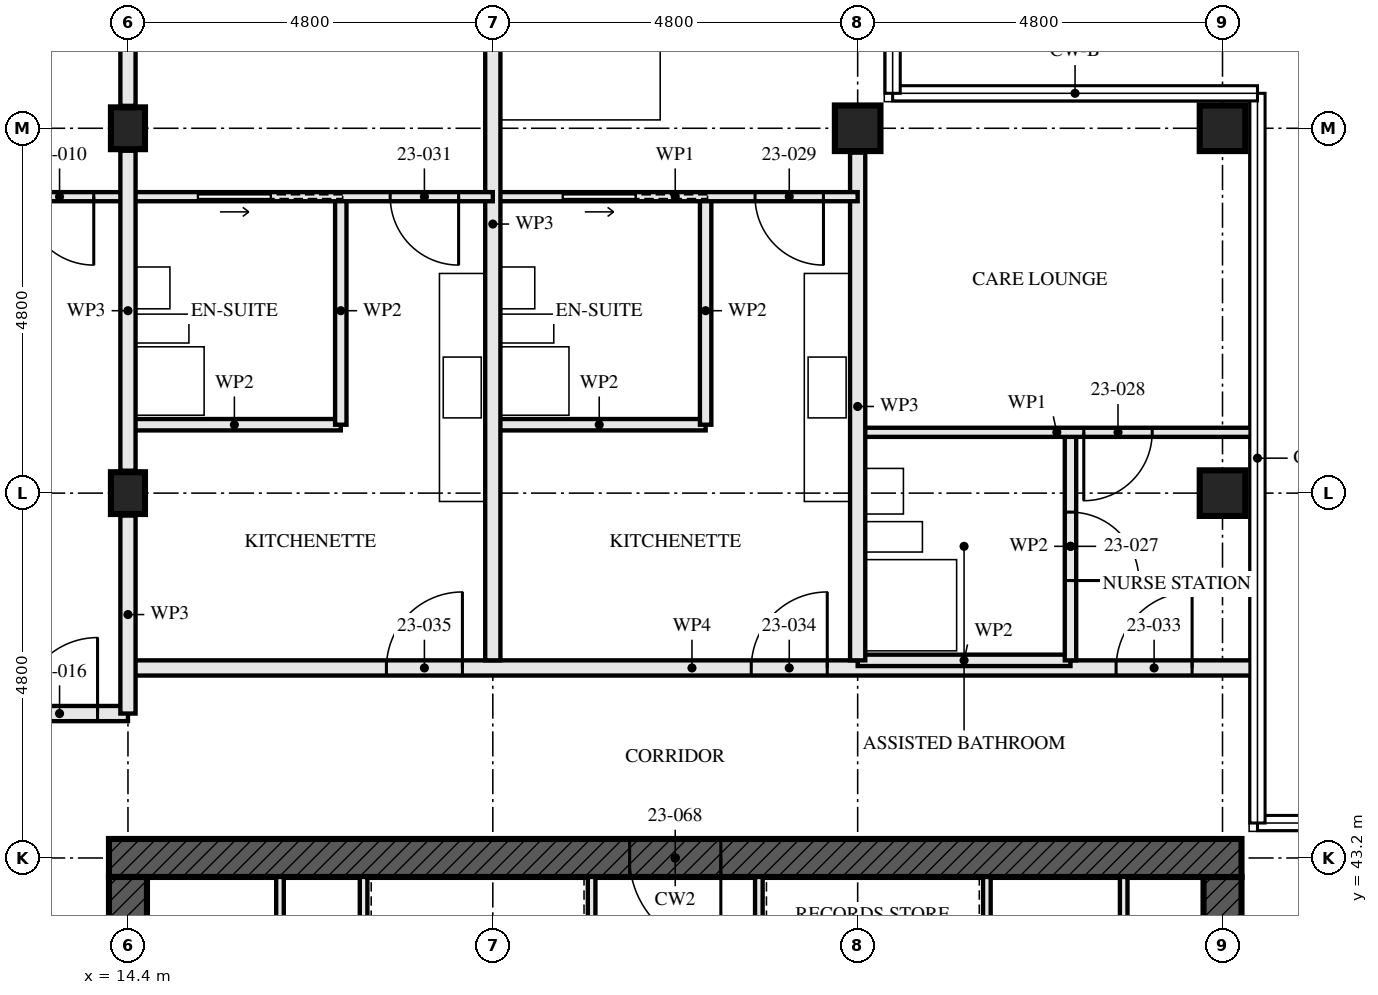
"""IFC4 building model, lengths in metres.
Left out: names, types, materials, properties, quantities, classifications, styles, units other than length and angle.
Written with IfcOpenShell. Run it as: python <this file> out.ifc"""

import sys

from ifc_helpers import new_model, si_unit, direction, frame, frame_2d, origin, origin_2d, place, context, subcontext, project, spatial, rectangle, hollow_rectangle, i_section, extrude, element, fill, save


model = new_model("IFC4")
c1 = context("Model", 3, precision=1e-05, world=origin(), true_north=direction((0.0, 1.0)))
c2 = subcontext(c1, "Body", "Model", "MODEL_VIEW")
j1 = project(units=[si_unit("LENGTHUNIT", "METRE"), si_unit("PLANEANGLEUNIT", "RADIAN")], contexts=[c1])
p1 = place(None, origin())
s1 = spatial("IfcSite", under=j1, at=p1, CompositionType="ELEMENT")
p2 = place(p1, origin())
s2 = spatial("IfcBuilding", under=s1, at=p2, CompositionType="ELEMENT")
p3 = place(p2, frame((0.0, 0.0, 87.5)))
s3 = spatial("IfcBuildingStorey", under=s2, at=p3, CompositionType="ELEMENT", Elevation=87.5)
for number, where, z_axis, x_axis in (
    (1, (14.4, 48.0, 0.0), (0.0, 0.0, 1.0), (1.0, 0.0, 0.0)),
    (2, (14.4, 52.8, 0.0), (0.0, 0.0, 1.0), (1.0, 0.0, 0.0)),
):
    element("IfcColumn", number, at=place(p3, frame(where, z_axis=z_axis, x_axis=x_axis)), inside=s3, PredefinedType="COLUMN", context=c2, shape_type="SweptSolid", body=[
        extrude(i_section(OverallWidth=0.448, OverallDepth=0.55, WebThickness=0.072, FlangeThickness=0.115, FilletRadius=0.015, at=origin_2d()), origin(), (0.0, 0.0, 1.0), 3.5),
    ])
for number, where, z_axis, x_axis in (
    (3, (24.0, 52.8, 0.0), (0.0, 0.0, 1.0), (0.0, 1.0, 0.0)),
    (4, (28.8, 48.0, 0.0), (0.0, 0.0, 1.0), (1.0, 0.0, 0.0)),
    (5, (28.8, 52.8, 0.0), (0.0, 0.0, 1.0), (0.0, 1.0, 0.0)),
):
    element("IfcColumn", number, at=place(p3, frame(where, z_axis=z_axis, x_axis=x_axis)), inside=s3, PredefinedType="COLUMN", context=c2, shape_type="SweptSolid", body=[
        extrude(hollow_rectangle(XDim=0.6, YDim=0.6, WallThickness=0.08, at=origin_2d()), origin(), (0.0, 0.0, 1.0), 3.5),
    ])
p4 = place(p3, frame((29.05, 43.2, -0.17), z_axis=(0.0, 0.0, 1.0), x_axis=(-1.0, 0.0, 0.0)))
e6 = element("IfcWall", 6, at=p4, inside=s3, PredefinedType="SHEAR", context=c2, shape_type="SweptSolid", body=[
    extrude(rectangle(XDim=14.9, YDim=0.5, at=frame_2d((7.45, 0.0))), origin(), (0.0, 0.0, 1.0), 3.5),
])
p5 = place(p4, frame((6.85, 0.0, 0.17)))
e7 = element("IfcOpeningElement", 7, at=p5, cuts=e6, PredefinedType="OPENING", context=c2, shape_type="SweptSolid", body=[
    extrude(rectangle(XDim=1.2, YDim=2.1, at=frame_2d((0.6, 1.05))), frame((0.0, 0.26, 0.0), z_axis=(0.0, -1.0, 0.0), x_axis=(1.0, 0.0, 0.0)), (0.0, 0.0, 1.0), 0.521),
])
p6 = place(p3, frame((14.4, 42.95, -0.17), z_axis=(0.0, 0.0, 1.0), x_axis=(0.0, -1.0, 0.0)))
e8 = element("IfcWall", 8, at=p6, inside=s3, PredefinedType="SHEAR", context=c2, shape_type="SweptSolid", body=[
    extrude(rectangle(XDim=13.9, YDim=0.5, at=frame_2d((6.95, 0.0))), origin(), (0.0, 0.0, 1.0), 3.5),
])
p7 = place(p6, frame((6.35, 0.0, 0.17)))
e9 = element("IfcOpeningElement", 9, at=p7, cuts=e8, PredefinedType="OPENING", context=c2, shape_type="SweptSolid", body=[
    extrude(rectangle(XDim=1.2, YDim=2.1, at=frame_2d((0.6, 1.05))), frame((0.0, 0.26, 0.0), z_axis=(0.0, -1.0, 0.0), x_axis=(1.0, 0.0, 0.0)), (0.0, 0.0, 1.0), 0.521),
])
p8 = place(p3, frame((28.8, 29.05, -0.17), z_axis=(0.0, 0.0, 1.0), x_axis=(0.0, 1.0, 0.0)))
e10 = element("IfcWall", 10, at=p8, inside=s3, PredefinedType="SHEAR", context=c2, shape_type="SweptSolid", body=[
    extrude(rectangle(XDim=13.9, YDim=0.5, at=frame_2d((6.95, 0.0))), origin(), (0.0, 0.0, 1.0), 3.5),
])
p9 = place(p8, frame((6.35, 0.0, 0.17)))
e11 = element("IfcOpeningElement", 11, at=p9, cuts=e10, PredefinedType="OPENING", context=c2, shape_type="SweptSolid", body=[
    extrude(rectangle(XDim=1.2, YDim=2.1, at=frame_2d((0.6, 1.05))), frame((0.0, 0.26, 0.0), z_axis=(0.0, -1.0, 0.0), x_axis=(1.0, 0.0, 0.0)), (0.0, 0.0, 1.0), 0.521),
])
p10 = place(p3, frame((14.4, 51.9, 0.0), z_axis=(0.0, 0.0, 1.0), x_axis=(-1.0, 0.0, 0.0)))
e12 = element("IfcWall", 12, at=p10, inside=s3, PredefinedType="PARTITIONING", context=c2, shape_type="SweptSolid", body=[
    extrude(rectangle(XDim=4.8, YDim=0.12, at=frame_2d((2.4, 0.0))), origin(), (0.0, 0.0, 1.0), 3.33),
])
p11 = place(p10, frame((0.45, 0.0, 0.0)))
e13 = element("IfcOpeningElement", 13, at=p11, cuts=e12, PredefinedType="OPENING", context=c2, shape_type="SweptSolid", body=[
    extrude(rectangle(XDim=0.9, YDim=2.1, at=frame_2d((0.45, 1.05))), frame((0.0, 0.071, 0.0), z_axis=(0.0, -1.0, 0.0), x_axis=(1.0, 0.0, 0.0)), (0.0, 0.0, 1.0), 0.141),
])
p12 = place(p10, frame((2.925, 0.0, 0.0)))
e14 = element("IfcOpeningElement", 14, at=p12, cuts=e12, PredefinedType="OPENING", context=c2, shape_type="SweptSolid", body=[
    extrude(rectangle(XDim=0.95, YDim=2.1, at=frame_2d((0.475, 1.05))), frame((0.0, 0.071, 0.0), z_axis=(0.0, -1.0, 0.0), x_axis=(1.0, 0.0, 0.0)), (0.0, 0.0, 1.0), 0.141),
])
p13 = place(p3, frame((14.4, 45.1, 0.0), z_axis=(0.0, 0.0, 1.0), x_axis=(-1.0, 0.0, 0.0)))
e15 = element("IfcWall", 15, at=p13, inside=s3, PredefinedType="PARTITIONING", context=c2, shape_type="SweptSolid", body=[
    extrude(rectangle(XDim=9.6, YDim=0.2, at=frame_2d((4.8, 0.0))), origin(), (0.0, 0.0, 1.0), 3.33),
])
p14 = place(p13, frame((0.4, 0.0, 0.0)))
e16 = element("IfcOpeningElement", 16, at=p14, cuts=e15, PredefinedType="OPENING", context=c2, shape_type="SweptSolid", body=[
    extrude(rectangle(XDim=1.0, YDim=2.1, at=frame_2d((0.5, 1.05))), frame((0.0, 0.111, 0.0), z_axis=(0.0, -1.0, 0.0), x_axis=(1.0, 0.0, 0.0)), (0.0, 0.0, 1.0), 0.221),
])
p15 = place(p13, frame((5.2, 0.0, 0.0)))
e17 = element("IfcOpeningElement", 17, at=p15, cuts=e15, PredefinedType="OPENING", context=c2, shape_type="SweptSolid", body=[
    extrude(rectangle(XDim=1.0, YDim=2.1, at=frame_2d((0.5, 1.05))), frame((0.0, 0.111, 0.0), z_axis=(0.0, -1.0, 0.0), x_axis=(1.0, 0.0, 0.0)), (0.0, 0.0, 1.0), 0.221),
])
p16 = place(p3, frame((26.8, 48.8, 0.0), z_axis=(0.0, 0.0, 1.0), x_axis=(0.0, -1.0, 0.0)))
e18 = element("IfcWall", 18, at=p16, inside=s3, PredefinedType="PARTITIONING", context=c2, shape_type="SweptSolid", body=[
    extrude(rectangle(XDim=3.0, YDim=0.15, at=frame_2d((1.5, 0.0))), origin(), (0.0, 0.0, 1.0), 2.55),
])
p17 = place(p16, frame((1.05, 0.0, 0.0)))
e19 = element("IfcOpeningElement", 19, at=p17, cuts=e18, PredefinedType="OPENING", context=c2, shape_type="SweptSolid", body=[
    extrude(rectangle(XDim=0.9, YDim=2.1, at=frame_2d((0.45, 1.05))), frame((0.0, 0.085, 0.0), z_axis=(0.0, -1.0, 0.0), x_axis=(1.0, 0.0, 0.0)), (0.0, 0.0, 1.0), 0.171),
])
p18 = place(p3, frame((26.8, 45.8, 0.0), z_axis=(0.0, 0.0, 1.0), x_axis=(-1.0, 0.0, 0.0)))
e20 = element("IfcWall", 20, at=p18, inside=s3, PredefinedType="PARTITIONING", context=c2, shape_type="SweptSolid", body=[
    extrude(rectangle(XDim=2.8, YDim=0.15, at=frame_2d((1.4, 0.0))), origin(), (0.0, 0.0, 1.0), 3.33),
])
p19 = place(p3, frame((29.24, 48.8, 0.0), z_axis=(0.0, 0.0, 1.0), x_axis=(-1.0, 0.0, 0.0)))
e21 = element("IfcWall", 21, at=p19, inside=s3, PredefinedType="PARTITIONING", context=c2, shape_type="SweptSolid", body=[
    extrude(rectangle(XDim=5.24, YDim=0.12, at=frame_2d((2.62, 0.0))), origin(), (0.0, 0.0, 1.0), 2.32),
])
p20 = place(p19, frame((1.365, 0.0, 0.0)))
e22 = element("IfcOpeningElement", 22, at=p20, cuts=e21, PredefinedType="OPENING", context=c2, shape_type="SweptSolid", body=[
    extrude(rectangle(XDim=0.9, YDim=2.1, at=frame_2d((0.45, 1.05))), frame((0.0, 0.071, 0.0), z_axis=(0.0, -1.0, 0.0), x_axis=(1.0, 0.0, 0.0)), (0.0, 0.0, 1.0), 0.141),
])
p21 = place(p3, frame((24.0, 52.48, 0.0), z_axis=(0.0, 0.0, 1.0), x_axis=(0.0, -1.0, 0.0)))
e23 = element("IfcWall", 23, at=p21, inside=s3, PredefinedType="PARTITIONING", context=c2, shape_type="SweptSolid", body=[
    extrude(rectangle(XDim=6.68, YDim=0.2, at=frame_2d((3.34, 0.0))), origin(), (0.0, 0.0, 1.0), 2.55),
])
p22 = place(p3, frame((22.0, 51.9, 0.0), z_axis=(0.0, 0.0, 1.0), x_axis=(0.0, -1.0, 0.0)))
e24 = element("IfcWall", 24, at=p22, inside=s3, PredefinedType="PARTITIONING", context=c2, shape_type="SweptSolid", body=[
    extrude(rectangle(XDim=3.0, YDim=0.15, at=frame_2d((1.5, 0.0))), origin(), (0.0, 0.0, 1.0), 3.33),
])
p23 = place(p3, frame((22.0, 48.9, 0.0), z_axis=(0.0, 0.0, 1.0), x_axis=(-1.0, 0.0, 0.0)))
e25 = element("IfcWall", 25, at=p23, inside=s3, PredefinedType="PARTITIONING", context=c2, shape_type="SweptSolid", body=[
    extrude(rectangle(XDim=2.8, YDim=0.15, at=frame_2d((1.4, 0.0))), origin(), (0.0, 0.0, 1.0), 3.33),
])
p24 = place(p3, frame((24.0, 51.9, 0.0), z_axis=(0.0, 0.0, 1.0), x_axis=(-1.0, 0.0, 0.0)))
e26 = element("IfcWall", 26, at=p24, inside=s3, PredefinedType="PARTITIONING", context=c2, shape_type="SweptSolid", body=[
    extrude(rectangle(XDim=4.8, YDim=0.12, at=frame_2d((2.4, 0.0))), origin(), (0.0, 0.0, 1.0), 3.33),
])
p25 = place(p24, frame((0.45, 0.0, 0.0)))
e27 = element("IfcOpeningElement", 27, at=p25, cuts=e26, PredefinedType="OPENING", context=c2, shape_type="SweptSolid", body=[
    extrude(rectangle(XDim=0.9, YDim=2.1, at=frame_2d((0.45, 1.05))), frame((0.0, 0.071, 0.0), z_axis=(0.0, -1.0, 0.0), x_axis=(1.0, 0.0, 0.0)), (0.0, 0.0, 1.0), 0.141),
])
p26 = place(p24, frame((2.925, 0.0, 0.0)))
e28 = element("IfcOpeningElement", 28, at=p26, cuts=e26, PredefinedType="OPENING", context=c2, shape_type="SweptSolid", body=[
    extrude(rectangle(XDim=0.95, YDim=2.1, at=frame_2d((0.475, 1.05))), frame((0.0, 0.071, 0.0), z_axis=(0.0, -1.0, 0.0), x_axis=(1.0, 0.0, 0.0)), (0.0, 0.0, 1.0), 0.141),
])
p27 = place(p3, frame((19.2, 57.28, 0.0), z_axis=(0.0, 0.0, 1.0), x_axis=(0.0, -1.0, 0.0)))
e29 = element("IfcWall", 29, at=p27, inside=s3, PredefinedType="PARTITIONING", context=c2, shape_type="SweptSolid", body=[
    extrude(rectangle(XDim=11.48, YDim=0.2, at=frame_2d((5.74, 0.0))), origin(), (0.0, 0.0, 1.0), 2.55),
])
p28 = place(p3, frame((17.2, 51.9, 0.0), z_axis=(0.0, 0.0, 1.0), x_axis=(0.0, -1.0, 0.0)))
e30 = element("IfcWall", 30, at=p28, inside=s3, PredefinedType="PARTITIONING", context=c2, shape_type="SweptSolid", body=[
    extrude(rectangle(XDim=3.0, YDim=0.15, at=frame_2d((1.5, 0.0))), origin(), (0.0, 0.0, 1.0), 3.33),
])
p29 = place(p3, frame((17.2, 48.9, 0.0), z_axis=(0.0, 0.0, 1.0), x_axis=(-1.0, 0.0, 0.0)))
e31 = element("IfcWall", 31, at=p29, inside=s3, PredefinedType="PARTITIONING", context=c2, shape_type="SweptSolid", body=[
    extrude(rectangle(XDim=2.8, YDim=0.15, at=frame_2d((1.4, 0.0))), origin(), (0.0, 0.0, 1.0), 3.33),
])
p30 = place(p3, frame((19.2, 51.9, 0.0), z_axis=(0.0, 0.0, 1.0), x_axis=(-1.0, 0.0, 0.0)))
e32 = element("IfcWall", 32, at=p30, inside=s3, PredefinedType="PARTITIONING", context=c2, shape_type="SweptSolid", body=[
    extrude(rectangle(XDim=4.8, YDim=0.12, at=frame_2d((2.4, 0.0))), origin(), (0.0, 0.0, 1.0), 3.33),
])
p31 = place(p30, frame((0.45, 0.0, 0.0)))
e33 = element("IfcOpeningElement", 33, at=p31, cuts=e32, PredefinedType="OPENING", context=c2, shape_type="SweptSolid", body=[
    extrude(rectangle(XDim=0.9, YDim=2.1, at=frame_2d((0.45, 1.05))), frame((0.0, 0.071, 0.0), z_axis=(0.0, -1.0, 0.0), x_axis=(1.0, 0.0, 0.0)), (0.0, 0.0, 1.0), 0.141),
])
p32 = place(p30, frame((2.925, 0.0, 0.0)))
e34 = element("IfcOpeningElement", 34, at=p32, cuts=e32, PredefinedType="OPENING", context=c2, shape_type="SweptSolid", body=[
    extrude(rectangle(XDim=0.95, YDim=2.1, at=frame_2d((0.475, 1.05))), frame((0.0, 0.071, 0.0), z_axis=(0.0, -1.0, 0.0), x_axis=(1.0, 0.0, 0.0)), (0.0, 0.0, 1.0), 0.141),
])
p33 = place(p3, frame((29.24, 45.7, 0.0), z_axis=(0.0, 0.0, 1.0), x_axis=(-1.0, 0.0, 0.0)))
e35 = element("IfcWall", 35, at=p33, inside=s3, PredefinedType="PARTITIONING", context=c2, shape_type="SweptSolid", body=[
    extrude(rectangle(XDim=14.84, YDim=0.2, at=frame_2d((7.42, 0.0))), origin(), (0.0, 0.0, 1.0), 2.32),
])
p34 = place(p33, frame((0.84, 0.0, 0.0)))
e36 = element("IfcOpeningElement", 36, at=p34, cuts=e35, PredefinedType="OPENING", context=c2, shape_type="SweptSolid", body=[
    extrude(rectangle(XDim=1.0, YDim=2.1, at=frame_2d((0.5, 1.05))), frame((0.0, 0.111, 0.0), z_axis=(0.0, -1.0, 0.0), x_axis=(1.0, 0.0, 0.0)), (0.0, 0.0, 1.0), 0.221),
])
p35 = place(p33, frame((5.64, 0.0, 0.0)))
e37 = element("IfcOpeningElement", 37, at=p35, cuts=e35, PredefinedType="OPENING", context=c2, shape_type="SweptSolid", body=[
    extrude(rectangle(XDim=1.0, YDim=2.1, at=frame_2d((0.5, 1.05))), frame((0.0, 0.111, 0.0), z_axis=(0.0, -1.0, 0.0), x_axis=(1.0, 0.0, 0.0)), (0.0, 0.0, 1.0), 0.221),
])
p36 = place(p33, frame((10.44, 0.0, 0.0)))
e38 = element("IfcOpeningElement", 38, at=p36, cuts=e35, PredefinedType="OPENING", context=c2, shape_type="SweptSolid", body=[
    extrude(rectangle(XDim=1.0, YDim=2.1, at=frame_2d((0.5, 1.05))), frame((0.0, 0.111, 0.0), z_axis=(0.0, -1.0, 0.0), x_axis=(1.0, 0.0, 0.0)), (0.0, 0.0, 1.0), 0.221),
])
for number, where, z_axis, x_axis in (
    (39, (16.4, 37.15, 0.0), (0.0, 0.0, 1.0), (0.0, 1.0, 0.0)),
    (40, (27.5, 37.15, 0.0), (0.0, 0.0, 1.0), (0.0, 1.0, 0.0)),
    (41, (20.5, 37.15, 0.0), (0.0, 0.0, 1.0), (0.0, 1.0, 0.0)),
):
    element("IfcWall", number, at=place(p3, frame(where, z_axis=z_axis, x_axis=x_axis)), inside=s3, PredefinedType="SOLIDWALL", context=c2, shape_type="SweptSolid", body=[
        extrude(rectangle(XDim=5.8, YDim=0.1, at=frame_2d((2.9, 0.0))), origin(), (0.0, 0.0, 1.0), 3.33),
    ])
p37 = place(p3, frame((22.7, 37.15, 0.0), z_axis=(0.0, 0.0, 1.0), x_axis=(0.0, 1.0, 0.0)))
e42 = element("IfcWall", 42, at=p37, inside=s3, PredefinedType="SOLIDWALL", context=c2, shape_type="SweptSolid", body=[
    extrude(rectangle(XDim=5.8, YDim=0.1, at=frame_2d((2.9, 0.0))), origin(), (0.0, 0.0, 1.0), 3.33),
])
p38 = place(p37, frame((0.925, 0.0, 0.0)))
e43 = element("IfcOpeningElement", 43, at=p38, cuts=e42, PredefinedType="OPENING", context=c2, shape_type="SweptSolid", body=[
    extrude(rectangle(XDim=1.0, YDim=2.1, at=frame_2d((0.5, 1.05))), frame((0.0, 0.061, 0.0), z_axis=(0.0, -1.0, 0.0), x_axis=(1.0, 0.0, 0.0)), (0.0, 0.0, 1.0), 0.121),
])
p39 = place(p37, frame((3.9, 0.0, 0.0)))
e44 = element("IfcOpeningElement", 44, at=p39, cuts=e42, PredefinedType="OPENING", context=c2, shape_type="SweptSolid", body=[
    extrude(rectangle(XDim=1.0, YDim=2.1, at=frame_2d((0.5, 1.05))), frame((0.0, 0.061, 0.0), z_axis=(0.0, -1.0, 0.0), x_axis=(1.0, 0.0, 0.0)), (0.0, 0.0, 1.0), 0.121),
])
for number, where, z_axis, x_axis in (
    (45, (17.5, 37.15, 0.0), (0.0, 0.0, 1.0), (0.0, 1.0, 0.0)),
    (46, (25.7, 37.15, 0.0), (0.0, 0.0, 1.0), (0.0, 1.0, 0.0)),
):
    element("IfcWall", number, at=place(p3, frame(where, z_axis=z_axis, x_axis=x_axis)), inside=s3, PredefinedType="SOLIDWALL", context=c2, shape_type="SweptSolid", body=[
        extrude(rectangle(XDim=5.8, YDim=0.1, at=frame_2d((2.9, 0.0))), origin(), (0.0, 0.0, 1.0), 3.33),
    ])
p40 = place(p3, frame((14.4, 45.1, 0.0), z_axis=(0.0, 0.0, 1.0), x_axis=(0.0, 1.0, 0.0)))
e47 = element("IfcWall", 47, at=p40, inside=s3, PredefinedType="PARTITIONING", context=c2, shape_type="SweptSolid", body=[
    extrude(rectangle(XDim=2.605, YDim=0.2, at=frame_2d((1.302, 0.0))), origin(), (0.0, 0.0, 1.0), 2.32),
])
p41 = place(p3, frame((14.4, 48.295, 0.0), z_axis=(0.0, 0.0, 1.0), x_axis=(0.0, 1.0, 0.0)))
e48 = element("IfcWall", 48, at=p41, inside=s3, PredefinedType="PARTITIONING", context=c2, shape_type="SweptSolid", body=[
    extrude(rectangle(XDim=4.21, YDim=0.2, at=frame_2d((2.105, 0.0))), origin(), (0.0, 0.0, 1.0), 2.32),
])
p42 = place(p3, frame((14.4, 53.095, 0.0), z_axis=(0.0, 0.0, 1.0), x_axis=(0.0, 1.0, 0.0)))
e49 = element("IfcWall", 49, at=p42, inside=s3, PredefinedType="PARTITIONING", context=c2, shape_type="SweptSolid", body=[
    extrude(rectangle(XDim=4.258, YDim=0.2, at=frame_2d((2.129, 0.0))), origin(), (0.0, 0.0, 1.0), 2.32),
])
p43 = place(p11, origin())
e50 = element("IfcDoor", 50, at=p43, inside=s3, OperationType="SINGLE_SWING_RIGHT", PredefinedType="DOOR", context=c2, shape_type="SweptSolid", body=[
    extrude(rectangle(XDim=0.9, YDim=2.1, at=frame_2d((0.45, 1.05))), frame((0.0, 0.022, 0.0), z_axis=(0.0, -1.0, 0.0), x_axis=(1.0, 0.0, 0.0)), (0.0, 0.0, 1.0), 0.044),
])
fill(e13, e50)
p44 = place(p14, frame((1.0, 0.0, 0.0), z_axis=(0.0, 0.0, 1.0), x_axis=(-1.0, 0.0, 0.0)))
e51 = element("IfcDoor", 51, at=p44, inside=s3, OperationType="SINGLE_SWING_LEFT", PredefinedType="DOOR", context=c2, shape_type="SweptSolid", body=[
    extrude(rectangle(XDim=1.0, YDim=2.1, at=frame_2d((0.5, 1.05))), frame((0.0, 0.027, 0.0), z_axis=(0.0, -1.0, 0.0), x_axis=(1.0, 0.0, 0.0)), (0.0, 0.0, 1.0), 0.054),
])
fill(e16, e51)
p45 = place(p17, origin())
e52 = element("IfcDoor", 52, at=p45, inside=s3, OperationType="SINGLE_SWING_LEFT", PredefinedType="DOOR", context=c2, shape_type="SweptSolid", body=[
    extrude(rectangle(XDim=0.9, YDim=2.1, at=frame_2d((0.45, 1.05))), frame((0.0, 0.022, 0.0), z_axis=(0.0, -1.0, 0.0), x_axis=(1.0, 0.0, 0.0)), (0.0, 0.0, 1.0), 0.044),
])
fill(e19, e52)
p46 = place(p20, origin())
e53 = element("IfcDoor", 53, at=p46, inside=s3, OperationType="SINGLE_SWING_LEFT", PredefinedType="DOOR", context=c2, shape_type="SweptSolid", body=[
    extrude(rectangle(XDim=0.9, YDim=2.1, at=frame_2d((0.45, 1.05))), frame((0.0, 0.022, 0.0), z_axis=(0.0, -1.0, 0.0), x_axis=(1.0, 0.0, 0.0)), (0.0, 0.0, 1.0), 0.044),
])
fill(e22, e53)
p47 = place(p25, origin())
e54 = element("IfcDoor", 54, at=p47, inside=s3, OperationType="SINGLE_SWING_RIGHT", PredefinedType="DOOR", context=c2, shape_type="SweptSolid", body=[
    extrude(rectangle(XDim=0.9, YDim=2.1, at=frame_2d((0.45, 1.05))), frame((0.0, 0.022, 0.0), z_axis=(0.0, -1.0, 0.0), x_axis=(1.0, 0.0, 0.0)), (0.0, 0.0, 1.0), 0.044),
])
fill(e27, e54)
p48 = place(p26, origin())
e55 = element("IfcDoor", 55, at=p48, inside=s3, OperationType="SLIDING_TO_RIGHT", PredefinedType="DOOR", context=c2, shape_type="SweptSolid", body=[
    extrude(rectangle(XDim=0.95, YDim=2.1, at=frame_2d((0.475, 1.05))), frame((0.0, 0.022, 0.0), z_axis=(0.0, -1.0, 0.0), x_axis=(1.0, 0.0, 0.0)), (0.0, 0.0, 1.0), 0.044),
])
fill(e28, e55)
p49 = place(p31, origin())
e56 = element("IfcDoor", 56, at=p49, inside=s3, OperationType="SINGLE_SWING_RIGHT", PredefinedType="DOOR", context=c2, shape_type="SweptSolid", body=[
    extrude(rectangle(XDim=0.9, YDim=2.1, at=frame_2d((0.45, 1.05))), frame((0.0, 0.022, 0.0), z_axis=(0.0, -1.0, 0.0), x_axis=(1.0, 0.0, 0.0)), (0.0, 0.0, 1.0), 0.044),
])
fill(e33, e56)
p50 = place(p32, origin())
e57 = element("IfcDoor", 57, at=p50, inside=s3, OperationType="SLIDING_TO_RIGHT", PredefinedType="DOOR", context=c2, shape_type="SweptSolid", body=[
    extrude(rectangle(XDim=0.95, YDim=2.1, at=frame_2d((0.475, 1.05))), frame((0.0, 0.022, 0.0), z_axis=(0.0, -1.0, 0.0), x_axis=(1.0, 0.0, 0.0)), (0.0, 0.0, 1.0), 0.044),
])
fill(e34, e57)
p51 = place(p34, frame((1.0, 0.0, 0.0), z_axis=(0.0, 0.0, 1.0), x_axis=(-1.0, 0.0, 0.0)))
e58 = element("IfcDoor", 58, at=p51, inside=s3, OperationType="SINGLE_SWING_LEFT", PredefinedType="DOOR", context=c2, shape_type="SweptSolid", body=[
    extrude(rectangle(XDim=1.0, YDim=2.1, at=frame_2d((0.5, 1.05))), frame((0.0, 0.027, 0.0), z_axis=(0.0, -1.0, 0.0), x_axis=(1.0, 0.0, 0.0)), (0.0, 0.0, 1.0), 0.054),
])
fill(e36, e58)
p52 = place(p35, frame((1.0, 0.0, 0.0), z_axis=(0.0, 0.0, 1.0), x_axis=(-1.0, 0.0, 0.0)))
e59 = element("IfcDoor", 59, at=p52, inside=s3, OperationType="SINGLE_SWING_LEFT", PredefinedType="DOOR", context=c2, shape_type="SweptSolid", body=[
    extrude(rectangle(XDim=1.0, YDim=2.1, at=frame_2d((0.5, 1.05))), frame((0.0, 0.027, 0.0), z_axis=(0.0, -1.0, 0.0), x_axis=(1.0, 0.0, 0.0)), (0.0, 0.0, 1.0), 0.054),
])
fill(e37, e59)
p53 = place(p36, frame((1.0, 0.0, 0.0), z_axis=(0.0, 0.0, 1.0), x_axis=(-1.0, 0.0, 0.0)))
e60 = element("IfcDoor", 60, at=p53, inside=s3, OperationType="SINGLE_SWING_LEFT", PredefinedType="DOOR", context=c2, shape_type="SweptSolid", body=[
    extrude(rectangle(XDim=1.0, YDim=2.1, at=frame_2d((0.5, 1.05))), frame((0.0, 0.027, 0.0), z_axis=(0.0, -1.0, 0.0), x_axis=(1.0, 0.0, 0.0)), (0.0, 0.0, 1.0), 0.054),
])
fill(e38, e60)
p54 = place(p5, origin())
e61 = element("IfcDoor", 61, at=p54, inside=s3, OperationType="SINGLE_SWING_LEFT", PredefinedType="DOOR", context=c2, shape_type="SweptSolid", body=[
    extrude(rectangle(XDim=1.2, YDim=2.1, at=frame_2d((0.6, 1.05))), frame((0.0, 0.027, 0.0), z_axis=(0.0, -1.0, 0.0), x_axis=(1.0, 0.0, 0.0)), (0.0, 0.0, 1.0), 0.054),
])
fill(e7, e61)
save(model, sys.argv[1])
